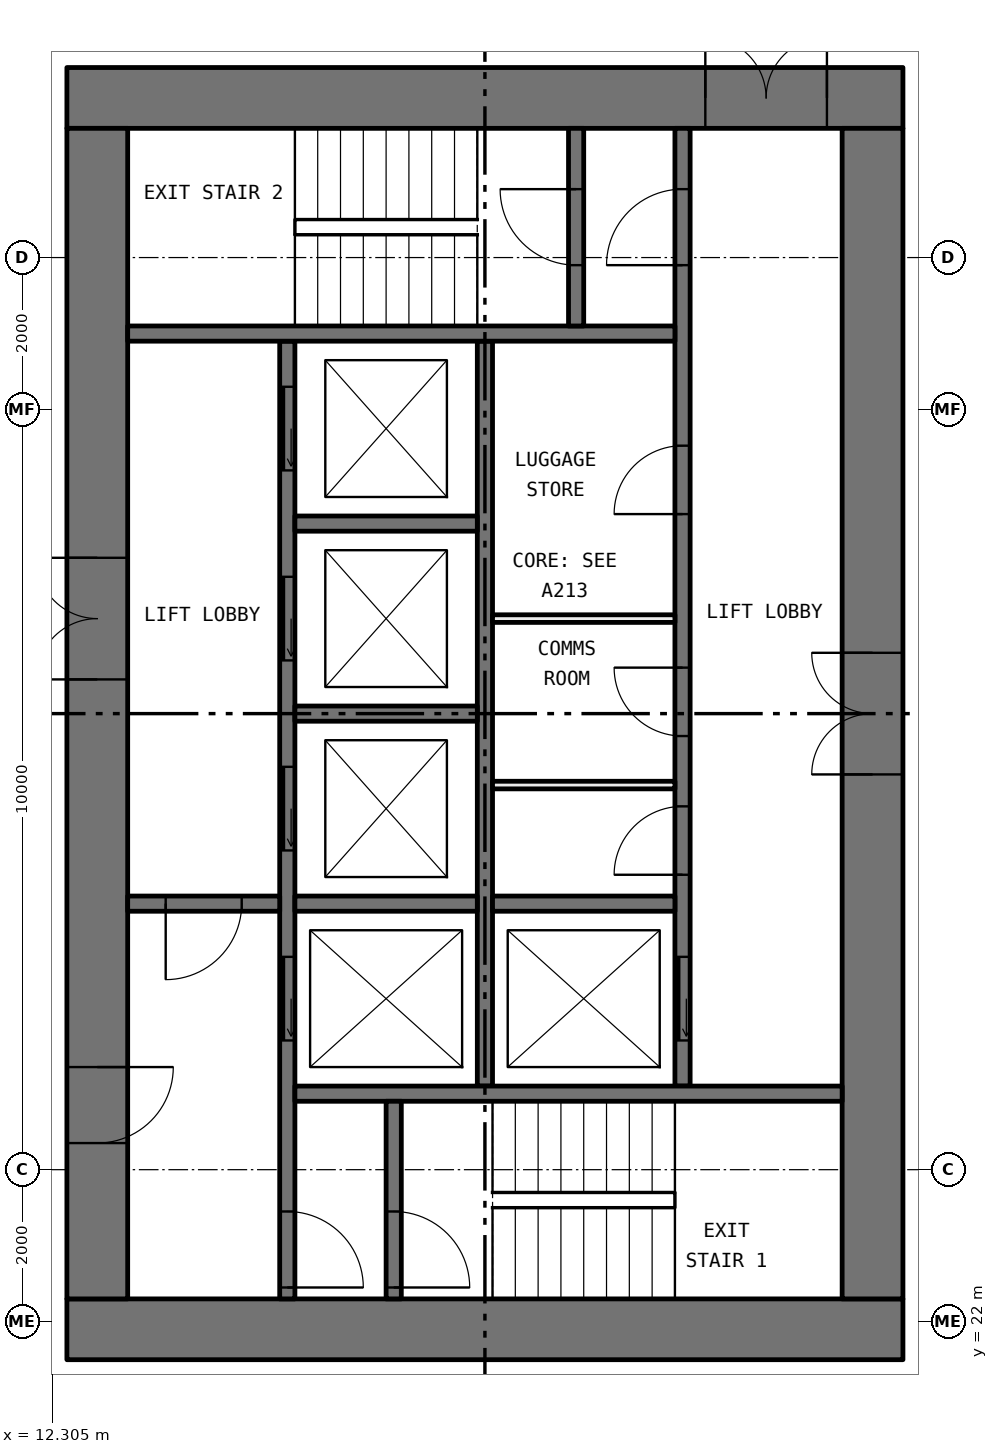
"""IFC4 building model, lengths in metres.
Left out: names, types, materials, properties, quantities, classifications, styles, units other than length and angle.
Written with IfcOpenShell. Run it as: python <this file> out.ifc"""

import sys

from ifc_helpers import new_model, si_unit, direction, frame, frame_2d, origin, place, context, subcontext, project, spatial, rectangle, extrude, element, fill, save


model = new_model("IFC4")
c1 = context("Model", 3, precision=1e-05, world=origin(), true_north=direction((0.0, 1.0)))
c2 = subcontext(c1, "Body", "Model", "MODEL_VIEW")
j1 = project(units=[si_unit("LENGTHUNIT", "METRE"), si_unit("PLANEANGLEUNIT", "RADIAN")], contexts=[c1])
p1 = place(None, origin())
s1 = spatial("IfcSite", under=j1, at=p1, CompositionType="ELEMENT")
p2 = place(p1, origin())
s2 = spatial("IfcBuilding", under=s1, at=p2, CompositionType="ELEMENT")
p3 = place(p2, frame((0.0, 0.0, 54.15)))
s3 = spatial("IfcBuildingStorey", under=s2, at=p3, CompositionType="ELEMENT", Elevation=54.15)
p4 = place(p3, frame((12.5, 21.9, 0.0), z_axis=(0.0, 0.0, 1.0), x_axis=(1.0, 0.0, 0.0)))
e1 = element("IfcWall", 1, at=p4, inside=s3, PredefinedType="SHEAR", context=c2, shape_type="SweptSolid", body=[
    extrude(rectangle(XDim=11.0, YDim=0.8, at=frame_2d((5.5, 0.0))), origin(), (0.0, 0.0, 1.0), 3.05),
])
p5 = place(p3, frame((12.5, 38.1, 0.0), z_axis=(0.0, 0.0, 1.0), x_axis=(1.0, 0.0, 0.0)))
e2 = element("IfcWall", 2, at=p5, inside=s3, PredefinedType="SHEAR", context=c2, shape_type="SweptSolid", body=[
    extrude(rectangle(XDim=11.0, YDim=0.8, at=frame_2d((5.5, 0.0))), origin(), (0.0, 0.0, 1.0), 3.05),
])
p6 = place(p5, frame((8.4, 0.0, 0.0)))
e3 = element("IfcOpeningElement", 3, at=p6, cuts=e2, PredefinedType="OPENING", context=c2, shape_type="SweptSolid", body=[
    extrude(rectangle(XDim=1.6, YDim=2.1, at=frame_2d((0.8, 1.05))), frame((0.0, 0.41, 0.0), z_axis=(0.0, -1.0, 0.0), x_axis=(1.0, 0.0, 0.0)), (0.0, 0.0, 1.0), 0.82),
])
p7 = place(p3, frame((12.9, 22.3, 0.0), z_axis=(0.0, 0.0, 1.0), x_axis=(0.0, 1.0, 0.0)))
e4 = element("IfcWall", 4, at=p7, inside=s3, PredefinedType="SHEAR", context=c2, shape_type="SweptSolid", body=[
    extrude(rectangle(XDim=15.4, YDim=0.8, at=frame_2d((7.7, 0.0))), origin(), (0.0, 0.0, 1.0), 3.05),
])
p8 = place(p7, frame((8.15, 0.0, 0.0)))
e5 = element("IfcOpeningElement", 5, at=p8, cuts=e4, PredefinedType="OPENING", context=c2, shape_type="SweptSolid", body=[
    extrude(rectangle(XDim=1.6, YDim=2.1, at=frame_2d((0.8, 1.05))), frame((0.0, 0.41, 0.0), z_axis=(0.0, -1.0, 0.0), x_axis=(1.0, 0.0, 0.0)), (0.0, 0.0, 1.0), 0.82),
])
p9 = place(p7, frame((2.05, 0.0, 0.0)))
e6 = element("IfcOpeningElement", 6, at=p9, cuts=e4, PredefinedType="OPENING", context=c2, shape_type="SweptSolid", body=[
    extrude(rectangle(XDim=1.0, YDim=2.1, at=frame_2d((0.5, 1.05))), frame((0.0, 0.41, 0.0), z_axis=(0.0, -1.0, 0.0), x_axis=(1.0, 0.0, 0.0)), (0.0, 0.0, 1.0), 0.82),
])
p10 = place(p3, frame((23.1, 22.3, 0.0), z_axis=(0.0, 0.0, 1.0), x_axis=(0.0, 1.0, 0.0)))
e7 = element("IfcWall", 7, at=p10, inside=s3, PredefinedType="SHEAR", context=c2, shape_type="SweptSolid", body=[
    extrude(rectangle(XDim=15.4, YDim=0.8, at=frame_2d((7.7, 0.0))), origin(), (0.0, 0.0, 1.0), 3.05),
])
p11 = place(p10, frame((6.9, 0.0, 0.0)))
e8 = element("IfcOpeningElement", 8, at=p11, cuts=e7, PredefinedType="OPENING", context=c2, shape_type="SweptSolid", body=[
    extrude(rectangle(XDim=1.6, YDim=2.1, at=frame_2d((0.8, 1.05))), frame((0.0, 0.41, 0.0), z_axis=(0.0, -1.0, 0.0), x_axis=(1.0, 0.0, 0.0)), (0.0, 0.0, 1.0), 0.82),
])
p12 = place(p3, frame((15.4, 22.3, 0.0), z_axis=(0.0, 0.0, 1.0), x_axis=(0.0, 1.0, 0.0)))
e9 = element("IfcWall", 9, at=p12, inside=s3, PredefinedType="SOLIDWALL", context=c2, shape_type="SweptSolid", body=[
    extrude(rectangle(XDim=12.6, YDim=0.2, at=frame_2d((6.3, 0.0))), origin(), (0.0, 0.0, 1.0), 3.05),
])
p13 = place(p12, frame((3.4, 0.0, 0.0)))
e10 = element("IfcOpeningElement", 10, at=p13, cuts=e9, PredefinedType="OPENING", context=c2, shape_type="SweptSolid", body=[
    extrude(rectangle(XDim=1.1, YDim=2.1, at=frame_2d((0.55, 1.05))), frame((0.0, 0.11, 0.0), z_axis=(0.0, -1.0, 0.0), x_axis=(1.0, 0.0, 0.0)), (0.0, 0.0, 1.0), 0.22),
])
p14 = place(p12, frame((5.9, 0.0, 0.0)))
e11 = element("IfcOpeningElement", 11, at=p14, cuts=e9, PredefinedType="OPENING", context=c2, shape_type="SweptSolid", body=[
    extrude(rectangle(XDim=1.1, YDim=2.1, at=frame_2d((0.55, 1.05))), frame((0.0, 0.11, 0.0), z_axis=(0.0, -1.0, 0.0), x_axis=(1.0, 0.0, 0.0)), (0.0, 0.0, 1.0), 0.22),
])
p15 = place(p12, frame((8.4, 0.0, 0.0)))
e12 = element("IfcOpeningElement", 12, at=p15, cuts=e9, PredefinedType="OPENING", context=c2, shape_type="SweptSolid", body=[
    extrude(rectangle(XDim=1.1, YDim=2.1, at=frame_2d((0.55, 1.05))), frame((0.0, 0.11, 0.0), z_axis=(0.0, -1.0, 0.0), x_axis=(1.0, 0.0, 0.0)), (0.0, 0.0, 1.0), 0.22),
])
p16 = place(p12, frame((10.9, 0.0, 0.0)))
e13 = element("IfcOpeningElement", 13, at=p16, cuts=e9, PredefinedType="OPENING", context=c2, shape_type="SweptSolid", body=[
    extrude(rectangle(XDim=1.1, YDim=2.1, at=frame_2d((0.55, 1.05))), frame((0.0, 0.11, 0.0), z_axis=(0.0, -1.0, 0.0), x_axis=(1.0, 0.0, 0.0)), (0.0, 0.0, 1.0), 0.22),
])
p17 = place(p12, frame((0.15, 0.0, 0.0)))
e14 = element("IfcOpeningElement", 14, at=p17, cuts=e9, PredefinedType="OPENING", context=c2, shape_type="SweptSolid", body=[
    extrude(rectangle(XDim=1.0, YDim=2.1, at=frame_2d((0.5, 1.05))), frame((0.0, 0.11, 0.0), z_axis=(0.0, -1.0, 0.0), x_axis=(1.0, 0.0, 0.0)), (0.0, 0.0, 1.0), 0.22),
])
p18 = place(p3, frame((20.6, 25.1, 0.0), z_axis=(0.0, 0.0, 1.0), x_axis=(0.0, 1.0, 0.0)))
e15 = element("IfcWall", 15, at=p18, inside=s3, PredefinedType="SOLIDWALL", context=c2, shape_type="SweptSolid", body=[
    extrude(rectangle(XDim=12.6, YDim=0.2, at=frame_2d((6.3, 0.0))), origin(), (0.0, 0.0, 1.0), 3.05),
])
p19 = place(p18, frame((0.6, 0.0, 0.0)))
e16 = element("IfcOpeningElement", 16, at=p19, cuts=e15, PredefinedType="OPENING", context=c2, shape_type="SweptSolid", body=[
    extrude(rectangle(XDim=1.1, YDim=2.1, at=frame_2d((0.55, 1.05))), frame((0.0, 0.11, 0.0), z_axis=(0.0, -1.0, 0.0), x_axis=(1.0, 0.0, 0.0)), (0.0, 0.0, 1.0), 0.22),
])
p20 = place(p18, frame((10.8, 0.0, 0.0)))
e17 = element("IfcOpeningElement", 17, at=p20, cuts=e15, PredefinedType="OPENING", context=c2, shape_type="SweptSolid", body=[
    extrude(rectangle(XDim=1.0, YDim=2.1, at=frame_2d((0.5, 1.05))), frame((0.0, 0.11, 0.0), z_axis=(0.0, -1.0, 0.0), x_axis=(1.0, 0.0, 0.0)), (0.0, 0.0, 1.0), 0.22),
])
p21 = place(p18, frame((2.78, 0.0, 0.0)))
e18 = element("IfcOpeningElement", 18, at=p21, cuts=e15, PredefinedType="OPENING", context=c2, shape_type="SweptSolid", body=[
    extrude(rectangle(XDim=0.9, YDim=2.1, at=frame_2d((0.45, 1.05))), frame((0.0, 0.11, 0.0), z_axis=(0.0, -1.0, 0.0), x_axis=(1.0, 0.0, 0.0)), (0.0, 0.0, 1.0), 0.22),
])
p22 = place(p18, frame((4.605, 0.0, 0.0)))
e19 = element("IfcOpeningElement", 19, at=p22, cuts=e15, PredefinedType="OPENING", context=c2, shape_type="SweptSolid", body=[
    extrude(rectangle(XDim=0.9, YDim=2.1, at=frame_2d((0.45, 1.05))), frame((0.0, 0.11, 0.0), z_axis=(0.0, -1.0, 0.0), x_axis=(1.0, 0.0, 0.0)), (0.0, 0.0, 1.0), 0.22),
])
p23 = place(p18, frame((7.525, 0.0, 0.0)))
e20 = element("IfcOpeningElement", 20, at=p23, cuts=e15, PredefinedType="OPENING", context=c2, shape_type="SweptSolid", body=[
    extrude(rectangle(XDim=0.9, YDim=2.1, at=frame_2d((0.45, 1.05))), frame((0.0, 0.11, 0.0), z_axis=(0.0, -1.0, 0.0), x_axis=(1.0, 0.0, 0.0)), (0.0, 0.0, 1.0), 0.22),
])
p24 = place(p3, frame((18.0, 25.1, 0.0), z_axis=(0.0, 0.0, 1.0), x_axis=(0.0, 1.0, 0.0)))
e21 = element("IfcWall", 21, at=p24, inside=s3, PredefinedType="SOLIDWALL", context=c2, shape_type="SweptSolid", body=[
    extrude(rectangle(XDim=9.8, YDim=0.2, at=frame_2d((4.9, 0.0))), origin(), (0.0, 0.0, 1.0), 3.05),
])
for number, where, z_axis, x_axis in (
    (22, (15.5, 25.0, 0.0), (0.0, 0.0, 1.0), (1.0, 0.0, 0.0)),
    (23, (13.3, 35.0, 0.0), (0.0, 0.0, 1.0), (1.0, 0.0, 0.0)),
):
    element("IfcWall", number, at=place(p3, frame(where, z_axis=z_axis, x_axis=x_axis)), inside=s3, PredefinedType="SOLIDWALL", context=c2, shape_type="SweptSolid", body=[
        extrude(rectangle(XDim=7.2, YDim=0.2, at=frame_2d((3.6, 0.0))), origin(), (0.0, 0.0, 1.0), 3.05),
    ])
p25 = place(p3, frame((13.3, 27.5, 0.0), z_axis=(0.0, 0.0, 1.0), x_axis=(1.0, 0.0, 0.0)))
e24 = element("IfcWall", 24, at=p25, inside=s3, PredefinedType="SOLIDWALL", context=c2, shape_type="SweptSolid", body=[
    extrude(rectangle(XDim=2.0, YDim=0.2, at=frame_2d((1.0, 0.0))), origin(), (0.0, 0.0, 1.0), 3.05),
])
p26 = place(p25, frame((0.5, 0.0, 0.0)))
e25 = element("IfcOpeningElement", 25, at=p26, cuts=e24, PredefinedType="OPENING", context=c2, shape_type="SweptSolid", body=[
    extrude(rectangle(XDim=1.0, YDim=2.1, at=frame_2d((0.5, 1.05))), frame((0.0, 0.11, 0.0), z_axis=(0.0, -1.0, 0.0), x_axis=(1.0, 0.0, 0.0)), (0.0, 0.0, 1.0), 0.22),
])
p27 = place(p3, frame((16.8, 22.3, 0.0), z_axis=(0.0, 0.0, 1.0), x_axis=(0.0, 1.0, 0.0)))
e26 = element("IfcWall", 26, at=p27, inside=s3, PredefinedType="SOLIDWALL", context=c2, shape_type="SweptSolid", body=[
    extrude(rectangle(XDim=2.6, YDim=0.2, at=frame_2d((1.3, 0.0))), origin(), (0.0, 0.0, 1.0), 3.05),
])
p28 = place(p27, frame((0.15, 0.0, 0.0)))
e27 = element("IfcOpeningElement", 27, at=p28, cuts=e26, PredefinedType="OPENING", context=c2, shape_type="SweptSolid", body=[
    extrude(rectangle(XDim=1.0, YDim=2.1, at=frame_2d((0.5, 1.05))), frame((0.0, 0.11, 0.0), z_axis=(0.0, -1.0, 0.0), x_axis=(1.0, 0.0, 0.0)), (0.0, 0.0, 1.0), 0.22),
])
p29 = place(p3, frame((19.2, 35.1, 0.0), z_axis=(0.0, 0.0, 1.0), x_axis=(0.0, 1.0, 0.0)))
e28 = element("IfcWall", 28, at=p29, inside=s3, PredefinedType="SOLIDWALL", context=c2, shape_type="SweptSolid", body=[
    extrude(rectangle(XDim=2.6, YDim=0.2, at=frame_2d((1.3, 0.0))), origin(), (0.0, 0.0, 1.0), 3.05),
])
p30 = place(p29, frame((0.8, 0.0, 0.0)))
e29 = element("IfcOpeningElement", 29, at=p30, cuts=e28, PredefinedType="OPENING", context=c2, shape_type="SweptSolid", body=[
    extrude(rectangle(XDim=1.0, YDim=2.1, at=frame_2d((0.5, 1.05))), frame((0.0, 0.11, 0.0), z_axis=(0.0, -1.0, 0.0), x_axis=(1.0, 0.0, 0.0)), (0.0, 0.0, 1.0), 0.22),
])
for number, where, z_axis, x_axis in (
    (30, (15.5, 27.5, 0.0), (0.0, 0.0, 1.0), (1.0, 0.0, 0.0)),
    (31, (15.5, 30.0, 0.0), (0.0, 0.0, 1.0), (1.0, 0.0, 0.0)),
    (32, (15.5, 32.5, 0.0), (0.0, 0.0, 1.0), (1.0, 0.0, 0.0)),
    (33, (18.1, 27.5, 0.0), (0.0, 0.0, 1.0), (1.0, 0.0, 0.0)),
):
    element("IfcWall", number, at=place(p3, frame(where, z_axis=z_axis, x_axis=x_axis)), inside=s3, PredefinedType="SOLIDWALL", context=c2, shape_type="SweptSolid", body=[
        extrude(rectangle(XDim=2.4, YDim=0.2, at=frame_2d((1.2, 0.0))), origin(), (0.0, 0.0, 1.0), 3.05),
    ])
for number, where, z_axis, x_axis in (
    (34, (18.1, 29.06, 0.0), (0.0, 0.0, 1.0), (1.0, 0.0, 0.0)),
    (35, (18.1, 31.25, 0.0), (0.0, 0.0, 1.0), (1.0, 0.0, 0.0)),
):
    element("IfcWall", number, at=place(p3, frame(where, z_axis=z_axis, x_axis=x_axis)), inside=s3, PredefinedType="PARTITIONING", context=c2, shape_type="SweptSolid", body=[
        extrude(rectangle(XDim=2.4, YDim=0.1, at=frame_2d((1.2, 0.0))), origin(), (0.0, 0.0, 1.0), 3.05),
    ])
p31 = place(p19, origin())
e36 = element("IfcDoor", 36, at=p31, inside=s3, OperationType="SLIDING_TO_LEFT", PredefinedType="DOOR", context=c2, shape_type="SweptSolid", body=[
    extrude(rectangle(XDim=1.1, YDim=2.1, at=frame_2d((0.55, 1.05))), frame((0.0, 0.025, 0.0), z_axis=(0.0, -1.0, 0.0), x_axis=(1.0, 0.0, 0.0)), (0.0, 0.0, 1.0), 0.05),
])
fill(e16, e36)
p32 = place(p13, origin())
e37 = element("IfcDoor", 37, at=p32, inside=s3, OperationType="SLIDING_TO_LEFT", PredefinedType="DOOR", context=c2, shape_type="SweptSolid", body=[
    extrude(rectangle(XDim=1.1, YDim=2.1, at=frame_2d((0.55, 1.05))), frame((0.0, 0.025, 0.0), z_axis=(0.0, -1.0, 0.0), x_axis=(1.0, 0.0, 0.0)), (0.0, 0.0, 1.0), 0.05),
])
fill(e10, e37)
p33 = place(p14, origin())
e38 = element("IfcDoor", 38, at=p33, inside=s3, OperationType="SLIDING_TO_LEFT", PredefinedType="DOOR", context=c2, shape_type="SweptSolid", body=[
    extrude(rectangle(XDim=1.1, YDim=2.1, at=frame_2d((0.55, 1.05))), frame((0.0, 0.025, 0.0), z_axis=(0.0, -1.0, 0.0), x_axis=(1.0, 0.0, 0.0)), (0.0, 0.0, 1.0), 0.05),
])
fill(e11, e38)
p34 = place(p15, origin())
e39 = element("IfcDoor", 39, at=p34, inside=s3, OperationType="SLIDING_TO_LEFT", PredefinedType="DOOR", context=c2, shape_type="SweptSolid", body=[
    extrude(rectangle(XDim=1.1, YDim=2.1, at=frame_2d((0.55, 1.05))), frame((0.0, 0.025, 0.0), z_axis=(0.0, -1.0, 0.0), x_axis=(1.0, 0.0, 0.0)), (0.0, 0.0, 1.0), 0.05),
])
fill(e12, e39)
p35 = place(p16, origin())
e40 = element("IfcDoor", 40, at=p35, inside=s3, OperationType="SLIDING_TO_LEFT", PredefinedType="DOOR", context=c2, shape_type="SweptSolid", body=[
    extrude(rectangle(XDim=1.1, YDim=2.1, at=frame_2d((0.55, 1.05))), frame((0.0, 0.025, 0.0), z_axis=(0.0, -1.0, 0.0), x_axis=(1.0, 0.0, 0.0)), (0.0, 0.0, 1.0), 0.05),
])
fill(e13, e40)
p36 = place(p28, frame((1.0, 0.0, 0.0), x_axis=(-1.0, 0.0, 0.0)))
e41 = element("IfcDoor", 41, at=p36, inside=s3, OperationType="SINGLE_SWING_LEFT", PredefinedType="DOOR", context=c2, shape_type="SweptSolid", body=[
    extrude(rectangle(XDim=1.0, YDim=2.1, at=frame_2d((0.5, 1.05))), frame((0.0, 0.025, 0.0), z_axis=(0.0, -1.0, 0.0), x_axis=(1.0, 0.0, 0.0)), (0.0, 0.0, 1.0), 0.05),
])
fill(e27, e41)
p37 = place(p17, frame((1.0, 0.0, 0.0), x_axis=(-1.0, 0.0, 0.0)))
e42 = element("IfcDoor", 42, at=p37, inside=s3, OperationType="SINGLE_SWING_LEFT", PredefinedType="DOOR", context=c2, shape_type="SweptSolid", body=[
    extrude(rectangle(XDim=1.0, YDim=2.1, at=frame_2d((0.5, 1.05))), frame((0.0, 0.025, 0.0), z_axis=(0.0, -1.0, 0.0), x_axis=(1.0, 0.0, 0.0)), (0.0, 0.0, 1.0), 0.05),
])
fill(e14, e42)
p38 = place(p20, origin())
e43 = element("IfcDoor", 43, at=p38, inside=s3, OperationType="SINGLE_SWING_RIGHT", PredefinedType="DOOR", context=c2, shape_type="SweptSolid", body=[
    extrude(rectangle(XDim=1.0, YDim=2.1, at=frame_2d((0.5, 1.05))), frame((0.0, 0.025, 0.0), z_axis=(0.0, -1.0, 0.0), x_axis=(1.0, 0.0, 0.0)), (0.0, 0.0, 1.0), 0.05),
])
fill(e17, e43)
p39 = place(p30, origin())
e44 = element("IfcDoor", 44, at=p39, inside=s3, OperationType="SINGLE_SWING_LEFT", PredefinedType="DOOR", context=c2, shape_type="SweptSolid", body=[
    extrude(rectangle(XDim=1.0, YDim=2.1, at=frame_2d((0.5, 1.05))), frame((0.0, 0.025, 0.0), z_axis=(0.0, -1.0, 0.0), x_axis=(1.0, 0.0, 0.0)), (0.0, 0.0, 1.0), 0.05),
])
fill(e29, e44)
p40 = place(p26, frame((1.0, 0.0, 0.0), x_axis=(-1.0, 0.0, 0.0)))
e45 = element("IfcDoor", 45, at=p40, inside=s3, OperationType="SINGLE_SWING_LEFT", PredefinedType="DOOR", context=c2, shape_type="SweptSolid", body=[
    extrude(rectangle(XDim=1.0, YDim=2.1, at=frame_2d((0.5, 1.05))), frame((0.0, 0.025, 0.0), z_axis=(0.0, -1.0, 0.0), x_axis=(1.0, 0.0, 0.0)), (0.0, 0.0, 1.0), 0.05),
])
fill(e25, e45)
p41 = place(p8, origin())
e46 = element("IfcDoor", 46, at=p41, inside=s3, OperationType="DOUBLE_DOOR_SINGLE_SWING", PredefinedType="DOOR", context=c2, shape_type="SweptSolid", body=[
    extrude(rectangle(XDim=1.6, YDim=2.1, at=frame_2d((0.8, 1.05))), frame((0.0, 0.025, 0.0), z_axis=(0.0, -1.0, 0.0), x_axis=(1.0, 0.0, 0.0)), (0.0, 0.0, 1.0), 0.05),
])
fill(e5, e46)
p42 = place(p9, frame((1.0, 0.0, 0.0), x_axis=(-1.0, 0.0, 0.0)))
e47 = element("IfcDoor", 47, at=p42, inside=s3, OperationType="SINGLE_SWING_RIGHT", PredefinedType="DOOR", context=c2, shape_type="SweptSolid", body=[
    extrude(rectangle(XDim=1.0, YDim=2.1, at=frame_2d((0.5, 1.05))), frame((0.0, 0.025, 0.0), z_axis=(0.0, -1.0, 0.0), x_axis=(1.0, 0.0, 0.0)), (0.0, 0.0, 1.0), 0.05),
])
fill(e6, e47)
p43 = place(p6, origin())
e48 = element("IfcDoor", 48, at=p43, inside=s3, OperationType="DOUBLE_DOOR_SINGLE_SWING", PredefinedType="DOOR", context=c2, shape_type="SweptSolid", body=[
    extrude(rectangle(XDim=1.6, YDim=2.1, at=frame_2d((0.8, 1.05))), frame((0.0, 0.025, 0.0), z_axis=(0.0, -1.0, 0.0), x_axis=(1.0, 0.0, 0.0)), (0.0, 0.0, 1.0), 0.05),
])
fill(e3, e48)
p44 = place(p11, origin())
e49 = element("IfcDoor", 49, at=p44, inside=s3, OperationType="DOUBLE_DOOR_SINGLE_SWING", PredefinedType="DOOR", context=c2, shape_type="SweptSolid", body=[
    extrude(rectangle(XDim=1.6, YDim=2.1, at=frame_2d((0.8, 1.05))), frame((0.0, 0.025, 0.0), z_axis=(0.0, -1.0, 0.0), x_axis=(1.0, 0.0, 0.0)), (0.0, 0.0, 1.0), 0.05),
])
fill(e8, e49)
p45 = place(p21, origin())
e50 = element("IfcDoor", 50, at=p45, inside=s3, OperationType="SINGLE_SWING_RIGHT", PredefinedType="DOOR", context=c2, shape_type="SweptSolid", body=[
    extrude(rectangle(XDim=0.9, YDim=2.1, at=frame_2d((0.45, 1.05))), frame((0.0, 0.025, 0.0), z_axis=(0.0, -1.0, 0.0), x_axis=(1.0, 0.0, 0.0)), (0.0, 0.0, 1.0), 0.05),
])
fill(e18, e50)
p46 = place(p22, origin())
e51 = element("IfcDoor", 51, at=p46, inside=s3, OperationType="SINGLE_SWING_LEFT", PredefinedType="DOOR", context=c2, shape_type="SweptSolid", body=[
    extrude(rectangle(XDim=0.9, YDim=2.1, at=frame_2d((0.45, 1.05))), frame((0.0, 0.025, 0.0), z_axis=(0.0, -1.0, 0.0), x_axis=(1.0, 0.0, 0.0)), (0.0, 0.0, 1.0), 0.05),
])
fill(e19, e51)
p47 = place(p23, origin())
e52 = element("IfcDoor", 52, at=p47, inside=s3, OperationType="SINGLE_SWING_RIGHT", PredefinedType="DOOR", context=c2, shape_type="SweptSolid", body=[
    extrude(rectangle(XDim=0.9, YDim=2.1, at=frame_2d((0.45, 1.05))), frame((0.0, 0.025, 0.0), z_axis=(0.0, -1.0, 0.0), x_axis=(1.0, 0.0, 0.0)), (0.0, 0.0, 1.0), 0.05),
])
fill(e20, e52)
save(model, sys.argv[1])
